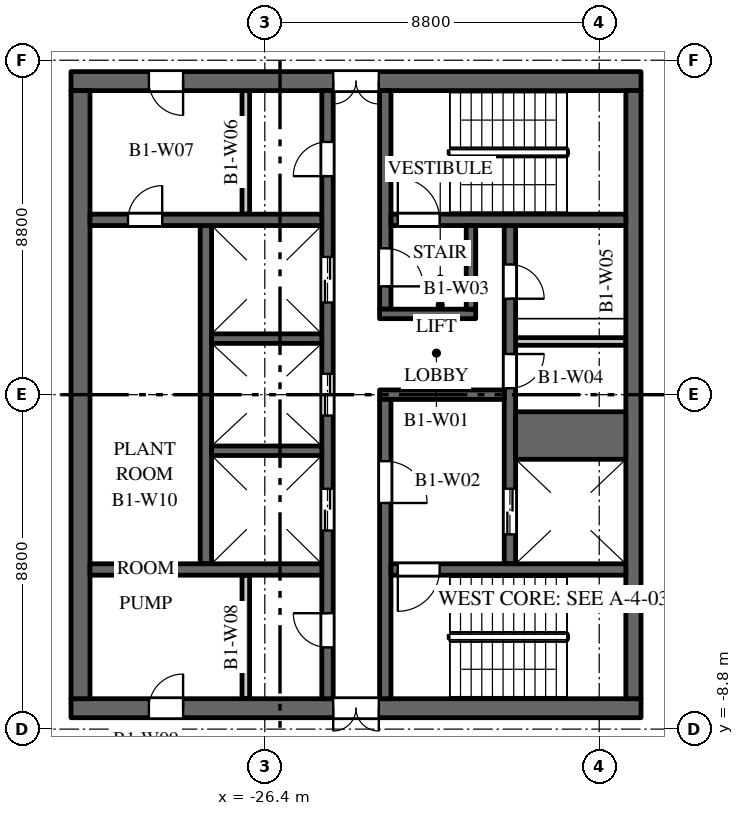
"""IFC4 building model, lengths in metres.
Left out: names, types, materials, properties, quantities, classifications, styles, units other than length and angle.
Written with IfcOpenShell. Run it as: python <this file> out.ifc"""

import sys

from ifc_helpers import new_model, si_unit, direction, frame, frame_2d, origin, place, context, subcontext, project, spatial, rectangle, extrude, element, fill, save


model = new_model("IFC4")
c1 = context("Model", 3, precision=1e-05, world=origin(), true_north=direction((0.0, 1.0)))
c2 = subcontext(c1, "Body", "Model", "MODEL_VIEW")
j1 = project(units=[si_unit("LENGTHUNIT", "METRE"), si_unit("PLANEANGLEUNIT", "RADIAN")], contexts=[c1])
p1 = place(None, origin())
s1 = spatial("IfcSite", under=j1, at=p1, CompositionType="ELEMENT")
p2 = place(p1, origin())
s2 = spatial("IfcBuilding", under=s1, at=p2, CompositionType="ELEMENT")
p3 = place(p2, frame((0.0, 0.0, -4.2)))
s3 = spatial("IfcBuildingStorey", under=s2, at=p3, CompositionType="ELEMENT", Elevation=-4.2)
p4 = place(p3, frame((-16.5, 8.25, 0.0), z_axis=(0.0, 0.0, 1.0), x_axis=(-1.0, 0.0, 0.0)))
e1 = element("IfcWall", 1, at=p4, inside=s3, PredefinedType="SHEAR", context=c2, shape_type="SweptSolid", body=[
    extrude(rectangle(XDim=15.0, YDim=0.5, at=frame_2d((7.5, 0.0))), origin(), (0.0, 0.0, 1.0), 3.85),
])
p5 = place(p4, frame((6.9, 0.0, 0.0)))
e2 = element("IfcOpeningElement", 2, at=p5, cuts=e1, PredefinedType="OPENING", context=c2, shape_type="SweptSolid", body=[
    extrude(rectangle(XDim=1.2, YDim=2.1, at=frame_2d((0.6, 1.05))), frame((0.0, 0.26, 0.0), z_axis=(0.0, -1.0, 0.0), x_axis=(1.0, 0.0, 0.0)), (0.0, 0.0, 1.0), 0.52),
])
p6 = place(p4, frame((12.05, 0.0, 0.0)))
e3 = element("IfcOpeningElement", 3, at=p6, cuts=e1, PredefinedType="OPENING", context=c2, shape_type="SweptSolid", body=[
    extrude(rectangle(XDim=0.9, YDim=2.1, at=frame_2d((0.45, 1.05))), frame((0.0, 0.26, 0.0), z_axis=(0.0, -1.0, 0.0), x_axis=(1.0, 0.0, 0.0)), (0.0, 0.0, 1.0), 0.52),
])
p7 = place(p3, frame((-16.5, -8.25, 0.0), z_axis=(0.0, 0.0, 1.0), x_axis=(-1.0, 0.0, 0.0)))
e4 = element("IfcWall", 4, at=p7, inside=s3, PredefinedType="SHEAR", context=c2, shape_type="SweptSolid", body=[
    extrude(rectangle(XDim=15.0, YDim=0.5, at=frame_2d((7.5, 0.0))), origin(), (0.0, 0.0, 1.0), 3.85),
])
p8 = place(p7, frame((6.9, 0.0, 0.0)))
e5 = element("IfcOpeningElement", 5, at=p8, cuts=e4, PredefinedType="OPENING", context=c2, shape_type="SweptSolid", body=[
    extrude(rectangle(XDim=1.2, YDim=2.1, at=frame_2d((0.6, 1.05))), frame((0.0, 0.26, 0.0), z_axis=(0.0, -1.0, 0.0), x_axis=(1.0, 0.0, 0.0)), (0.0, 0.0, 1.0), 0.52),
])
p9 = place(p7, frame((12.05, 0.0, 0.0)))
e6 = element("IfcOpeningElement", 6, at=p9, cuts=e4, PredefinedType="OPENING", context=c2, shape_type="SweptSolid", body=[
    extrude(rectangle(XDim=0.9, YDim=2.1, at=frame_2d((0.45, 1.05))), frame((0.0, 0.26, 0.0), z_axis=(0.0, -1.0, 0.0), x_axis=(1.0, 0.0, 0.0)), (0.0, 0.0, 1.0), 0.52),
])
p10 = place(p3, frame((-16.9, 1.4, 0.0), z_axis=(0.0, 0.0, 1.0), x_axis=(-1.0, 0.0, 0.0)))
e7 = element("IfcWall", 7, at=p10, inside=s3, PredefinedType="PARTITIONING", context=c2, shape_type="SweptSolid", body=[
    extrude(rectangle(XDim=2.9, YDim=0.2, at=frame_2d((1.45, 0.0))), origin(), (0.0, 0.0, 1.0), 3.85),
])
p11 = place(p3, frame((-27.95, -4.45, 0.0), z_axis=(0.0, 0.0, 1.0), x_axis=(0.0, 1.0, 0.0)))
e8 = element("IfcWall", 8, at=p11, inside=s3, PredefinedType="SHEAR", context=c2, shape_type="SweptSolid", body=[
    extrude(rectangle(XDim=8.9, YDim=0.3, at=frame_2d((4.45, 0.0))), origin(), (0.0, 0.0, 1.0), 3.85),
])
p12 = place(p3, frame((-19.95, -4.45, 0.0), z_axis=(0.0, 0.0, 1.0), x_axis=(0.0, 1.0, 0.0)))
e9 = element("IfcWall", 9, at=p12, inside=s3, PredefinedType="SHEAR", context=c2, shape_type="SweptSolid", body=[
    extrude(rectangle(XDim=8.9, YDim=0.3, at=frame_2d((4.45, 0.0))), origin(), (0.0, 0.0, 1.0), 3.85),
])
p13 = place(p12, frame((0.775, 0.0, 0.0)))
e10 = element("IfcOpeningElement", 10, at=p13, cuts=e9, PredefinedType="OPENING", context=c2, shape_type="SweptSolid", body=[
    extrude(rectangle(XDim=1.2, YDim=2.1, at=frame_2d((0.6, 1.05))), frame((0.0, 0.16, 0.0), z_axis=(0.0, -1.0, 0.0), x_axis=(1.0, 0.0, 0.0)), (0.0, 0.0, 1.0), 0.32),
])
p14 = place(p12, frame((4.62, 0.0, 0.0)))
e11 = element("IfcOpeningElement", 11, at=p14, cuts=e9, PredefinedType="OPENING", context=c2, shape_type="SweptSolid", body=[
    extrude(rectangle(XDim=0.9, YDim=2.1, at=frame_2d((0.45, 1.05))), frame((0.0, 0.16, 0.0), z_axis=(0.0, -1.0, 0.0), x_axis=(1.0, 0.0, 0.0)), (0.0, 0.0, 1.0), 0.32),
])
p15 = place(p12, frame((6.975, 0.0, 0.0)))
e12 = element("IfcOpeningElement", 12, at=p15, cuts=e9, PredefinedType="OPENING", context=c2, shape_type="SweptSolid", body=[
    extrude(rectangle(XDim=0.9, YDim=2.1, at=frame_2d((0.45, 1.05))), frame((0.0, 0.16, 0.0), z_axis=(0.0, -1.0, 0.0), x_axis=(1.0, 0.0, 0.0)), (0.0, 0.0, 1.0), 0.32),
])
p16 = place(p3, frame((-24.75, -8.0, 0.0), z_axis=(0.0, 0.0, 1.0), x_axis=(0.0, 1.0, 0.0)))
e13 = element("IfcWall", 13, at=p16, inside=s3, PredefinedType="SHEAR", context=c2, shape_type="SweptSolid", body=[
    extrude(rectangle(XDim=16.0, YDim=0.3, at=frame_2d((8.0, 0.0))), origin(), (0.0, 0.0, 1.0), 3.85),
])
p17 = place(p16, frame((4.425, 0.0, 0.0)))
e14 = element("IfcOpeningElement", 14, at=p17, cuts=e13, PredefinedType="OPENING", context=c2, shape_type="SweptSolid", body=[
    extrude(rectangle(XDim=1.1, YDim=2.1, at=frame_2d((0.55, 1.05))), frame((0.0, 0.16, 0.0), z_axis=(0.0, -1.0, 0.0), x_axis=(1.0, 0.0, 0.0)), (0.0, 0.0, 1.0), 0.32),
])
p18 = place(p16, frame((7.45, 0.0, 0.0)))
e15 = element("IfcOpeningElement", 15, at=p18, cuts=e13, PredefinedType="OPENING", context=c2, shape_type="SweptSolid", body=[
    extrude(rectangle(XDim=1.1, YDim=2.1, at=frame_2d((0.55, 1.05))), frame((0.0, 0.16, 0.0), z_axis=(0.0, -1.0, 0.0), x_axis=(1.0, 0.0, 0.0)), (0.0, 0.0, 1.0), 0.32),
])
p19 = place(p16, frame((10.425, 0.0, 0.0)))
e16 = element("IfcOpeningElement", 16, at=p19, cuts=e13, PredefinedType="OPENING", context=c2, shape_type="SweptSolid", body=[
    extrude(rectangle(XDim=1.2, YDim=2.1, at=frame_2d((0.6, 1.05))), frame((0.0, 0.16, 0.0), z_axis=(0.0, -1.0, 0.0), x_axis=(1.0, 0.0, 0.0)), (0.0, 0.0, 1.0), 0.32),
])
p20 = place(p16, frame((13.75, 0.0, 0.0)))
e17 = element("IfcOpeningElement", 17, at=p20, cuts=e13, PredefinedType="OPENING", context=c2, shape_type="SweptSolid", body=[
    extrude(rectangle(XDim=0.9, YDim=2.1, at=frame_2d((0.45, 1.05))), frame((0.0, 0.16, 0.0), z_axis=(0.0, -1.0, 0.0), x_axis=(1.0, 0.0, 0.0)), (0.0, 0.0, 1.0), 0.32),
])
p21 = place(p16, frame((1.35, 0.0, 0.0)))
e18 = element("IfcOpeningElement", 18, at=p21, cuts=e13, PredefinedType="OPENING", context=c2, shape_type="SweptSolid", body=[
    extrude(rectangle(XDim=0.9, YDim=2.1, at=frame_2d((0.45, 1.05))), frame((0.0, 0.16, 0.0), z_axis=(0.0, -1.0, 0.0), x_axis=(1.0, 0.0, 0.0)), (0.0, 0.0, 1.0), 0.32),
])
p22 = place(p3, frame((-20.1, 0.0, 0.0), z_axis=(0.0, 0.0, 1.0), x_axis=(-1.0, 0.0, 0.0)))
e19 = element("IfcWall", 19, at=p22, inside=s3, PredefinedType="SHEAR", context=c2, shape_type="SweptSolid", body=[
    extrude(rectangle(XDim=3.28, YDim=0.25, at=frame_2d((1.64, 0.0))), origin(), (0.0, 0.0, 1.0), 3.85),
])
p23 = place(p3, frame((-16.7, -8.0, 0.0), z_axis=(0.0, 0.0, 1.0), x_axis=(0.0, 1.0, 0.0)))
e20 = element("IfcWall", 20, at=p23, inside=s3, PredefinedType="SHEAR", context=c2, shape_type="SweptSolid", body=[
    extrude(rectangle(XDim=16.0, YDim=0.4, at=frame_2d((8.0, 0.0))), origin(), (0.0, 0.0, 1.0), 3.85),
])
p24 = place(p3, frame((-31.25, -8.0, 0.0), z_axis=(0.0, 0.0, 1.0), x_axis=(0.0, 1.0, 0.0)))
e21 = element("IfcWall", 21, at=p24, inside=s3, PredefinedType="SHEAR", context=c2, shape_type="SweptSolid", body=[
    extrude(rectangle(XDim=16.0, YDim=0.5, at=frame_2d((8.0, 0.0))), origin(), (0.0, 0.0, 1.0), 3.85),
])
p25 = place(p3, frame((-24.9, 4.6, 0.0), z_axis=(0.0, 0.0, 1.0), x_axis=(-1.0, 0.0, 0.0)))
e22 = element("IfcWall", 22, at=p25, inside=s3, PredefinedType="SHEAR", context=c2, shape_type="SweptSolid", body=[
    extrude(rectangle(XDim=6.1, YDim=0.3, at=frame_2d((3.05, 0.0))), origin(), (0.0, 0.0, 1.0), 3.85),
])
p26 = place(p25, frame((4.2, 0.0, 0.0)))
e23 = element("IfcOpeningElement", 23, at=p26, cuts=e22, PredefinedType="OPENING", context=c2, shape_type="SweptSolid", body=[
    extrude(rectangle(XDim=0.9, YDim=2.1, at=frame_2d((0.45, 1.05))), frame((0.0, 0.16, 0.0), z_axis=(0.0, -1.0, 0.0), x_axis=(1.0, 0.0, 0.0)), (0.0, 0.0, 1.0), 0.32),
])
for number, where, z_axis, x_axis in (
    (24, (-26.9, 4.75, 0.0), (0.0, 0.0, 1.0), (0.0, 1.0, 0.0)),
    (25, (-26.9, -8.0, 0.0), (0.0, 0.0, 1.0), (0.0, 1.0, 0.0)),
):
    element("IfcWall", number, at=place(p3, frame(where, z_axis=z_axis, x_axis=x_axis)), inside=s3, PredefinedType="PARTITIONING", context=c2, shape_type="SweptSolid", body=[
        extrude(rectangle(XDim=3.25, YDim=0.2, at=frame_2d((1.625, 0.0))), origin(), (0.0, 0.0, 1.0), 3.85),
    ])
p27 = place(p3, frame((-24.9, -4.6, 0.0), z_axis=(0.0, 0.0, 1.0), x_axis=(-1.0, 0.0, 0.0)))
e26 = element("IfcWall", 26, at=p27, inside=s3, PredefinedType="SHEAR", context=c2, shape_type="SweptSolid", body=[
    extrude(rectangle(XDim=6.1, YDim=0.3, at=frame_2d((3.05, 0.0))), origin(), (0.0, 0.0, 1.0), 3.85),
])
p28 = place(p3, frame((-16.9, -1.075, 0.0), z_axis=(0.0, 0.0, 1.0), x_axis=(-1.0, 0.0, 0.0)))
e27 = element("IfcWall", 27, at=p28, inside=s3, PredefinedType="SHEAR", context=c2, shape_type="SweptSolid", body=[
    extrude(rectangle(XDim=2.9, YDim=1.25, at=frame_2d((1.45, 0.0))), origin(), (0.0, 0.0, 1.0), 3.85),
])
for number, where, z_axis, x_axis in (
    (28, (-24.9, -1.475, 0.0), (0.0, 0.0, 1.0), (-1.0, 0.0, 0.0)),
    (29, (-24.9, 1.475, 0.0), (0.0, 0.0, 1.0), (-1.0, 0.0, 0.0)),
):
    element("IfcWall", number, at=place(p3, frame(where, z_axis=z_axis, x_axis=x_axis)), inside=s3, PredefinedType="SHEAR", context=c2, shape_type="SweptSolid", body=[
        extrude(rectangle(XDim=2.9, YDim=0.25, at=frame_2d((1.45, 0.0))), origin(), (0.0, 0.0, 1.0), 3.85),
    ])
p29 = place(p3, frame((-23.23, 2.25, 0.0), z_axis=(0.0, 0.0, 1.0), x_axis=(0.0, 1.0, 0.0)))
e30 = element("IfcWall", 30, at=p29, inside=s3, PredefinedType="SHEAR", context=c2, shape_type="SweptSolid", body=[
    extrude(rectangle(XDim=5.75, YDim=0.3, at=frame_2d((2.875, 0.0))), origin(), (0.0, 0.0, 1.0), 3.85),
])
p30 = place(p29, frame((0.6, 0.0, 0.0)))
e31 = element("IfcOpeningElement", 31, at=p30, cuts=e30, PredefinedType="OPENING", context=c2, shape_type="SweptSolid", body=[
    extrude(rectangle(XDim=1.0, YDim=2.1, at=frame_2d((0.5, 1.05))), frame((0.0, 0.16, 0.0), z_axis=(0.0, -1.0, 0.0), x_axis=(1.0, 0.0, 0.0)), (0.0, 0.0, 1.0), 0.32),
])
p31 = place(p3, frame((-23.23, -8.0, 0.0), z_axis=(0.0, 0.0, 1.0), x_axis=(0.0, 1.0, 0.0)))
e32 = element("IfcWall", 32, at=p31, inside=s3, PredefinedType="SHEAR", context=c2, shape_type="SweptSolid", body=[
    extrude(rectangle(XDim=7.875, YDim=0.3, at=frame_2d((3.938, 0.0))), origin(), (0.0, 0.0, 1.0), 3.85),
])
p32 = place(p31, frame((5.15, 0.0, 0.0)))
e33 = element("IfcOpeningElement", 33, at=p32, cuts=e32, PredefinedType="OPENING", context=c2, shape_type="SweptSolid", body=[
    extrude(rectangle(XDim=1.1, YDim=2.1, at=frame_2d((0.55, 1.05))), frame((0.0, 0.16, 0.0), z_axis=(0.0, -1.0, 0.0), x_axis=(1.0, 0.0, 0.0)), (0.0, 0.0, 1.0), 0.32),
])
p33 = place(p3, frame((-16.9, 4.6, 0.0), z_axis=(0.0, 0.0, 1.0), x_axis=(-1.0, 0.0, 0.0)))
e34 = element("IfcWall", 34, at=p33, inside=s3, PredefinedType="SHEAR", context=c2, shape_type="SweptSolid", body=[
    extrude(rectangle(XDim=6.18, YDim=0.3, at=frame_2d((3.09, 0.0))), origin(), (0.0, 0.0, 1.0), 3.85),
])
p34 = place(p33, frame((4.9, 0.0, 0.0)))
e35 = element("IfcOpeningElement", 35, at=p34, cuts=e34, PredefinedType="OPENING", context=c2, shape_type="SweptSolid", body=[
    extrude(rectangle(XDim=1.1, YDim=2.1, at=frame_2d((0.55, 1.05))), frame((0.0, 0.16, 0.0), z_axis=(0.0, -1.0, 0.0), x_axis=(1.0, 0.0, 0.0)), (0.0, 0.0, 1.0), 0.32),
])
p35 = place(p3, frame((-16.9, -4.6, 0.0), z_axis=(0.0, 0.0, 1.0), x_axis=(-1.0, 0.0, 0.0)))
e36 = element("IfcWall", 36, at=p35, inside=s3, PredefinedType="SHEAR", context=c2, shape_type="SweptSolid", body=[
    extrude(rectangle(XDim=6.18, YDim=0.3, at=frame_2d((3.09, 0.0))), origin(), (0.0, 0.0, 1.0), 3.85),
])
p36 = place(p35, frame((4.9, 0.0, 0.0)))
e37 = element("IfcOpeningElement", 37, at=p36, cuts=e36, PredefinedType="OPENING", context=c2, shape_type="SweptSolid", body=[
    extrude(rectangle(XDim=1.1, YDim=2.1, at=frame_2d((0.55, 1.05))), frame((0.0, 0.16, 0.0), z_axis=(0.0, -1.0, 0.0), x_axis=(1.0, 0.0, 0.0)), (0.0, 0.0, 1.0), 0.32),
])
p37 = place(p3, frame((-20.85, 2.125, 0.0), z_axis=(0.0, 0.0, 1.0), x_axis=(-1.0, 0.0, 0.0)))
e38 = element("IfcWall", 38, at=p37, inside=s3, PredefinedType="SHEAR", context=c2, shape_type="SweptSolid", body=[
    extrude(rectangle(XDim=2.53, YDim=0.25, at=frame_2d((1.265, 0.0))), origin(), (0.0, 0.0, 1.0), 3.85),
])
p38 = place(p3, frame((-20.975, 2.25, 0.0), z_axis=(0.0, 0.0, 1.0), x_axis=(0.0, 1.0, 0.0)))
e39 = element("IfcWall", 39, at=p38, inside=s3, PredefinedType="SHEAR", context=c2, shape_type="SweptSolid", body=[
    extrude(rectangle(XDim=2.2, YDim=0.25, at=frame_2d((1.1, 0.0))), origin(), (0.0, 0.0, 1.0), 3.85),
])
p39 = place(p3, frame((-31.157, 11.729, 0.0), z_axis=(0.0, 0.0, 1.0), x_axis=(-0.462265314279, -0.886741664305, 0.0)))
e40 = element("IfcWall", 40, at=p39, inside=s3, PredefinedType="SOLIDWALL", context=c2, shape_type="SweptSolid", body=[
    extrude(rectangle(XDim=4.135, YDim=0.25, at=frame_2d((2.067, 0.0))), origin(), (0.0, 0.0, 1.0), 2.95),
])
p40 = place(p39, frame((1.467, 0.0, 0.0)))
e41 = element("IfcOpeningElement", 41, at=p40, cuts=e40, PredefinedType="OPENING", context=c2, shape_type="SweptSolid", body=[
    extrude(rectangle(XDim=1.2, YDim=2.1, at=frame_2d((0.6, 1.05))), frame((0.0, 0.135, 0.0), z_axis=(0.0, -1.0, 0.0), x_axis=(1.0, 0.0, 0.0)), (0.0, 0.0, 1.0), 0.27),
])
p41 = place(p3, frame((-33.069, -8.062, 0.0), z_axis=(0.0, 0.0, 1.0), x_axis=(0.462265314279, -0.886741664305, 0.0)))
e42 = element("IfcWall", 42, at=p41, inside=s3, PredefinedType="SOLIDWALL", context=c2, shape_type="SweptSolid", body=[
    extrude(rectangle(XDim=4.135, YDim=0.25, at=frame_2d((2.067, 0.0))), origin(), (0.0, 0.0, 1.0), 2.95),
])
p42 = place(p13, origin())
e43 = element("IfcDoor", 43, at=p42, inside=s3, OperationType="DOUBLE_DOOR_SLIDING", PredefinedType="DOOR", context=c2, shape_type="SweptSolid", body=[
    extrude(rectangle(XDim=1.2, YDim=2.1, at=frame_2d((0.6, 1.05))), frame((0.0, 0.025, 0.0), z_axis=(0.0, -1.0, 0.0), x_axis=(1.0, 0.0, 0.0)), (0.0, 0.0, 1.0), 0.05),
])
fill(e10, e43)
p43 = place(p17, origin())
e44 = element("IfcDoor", 44, at=p43, inside=s3, OperationType="DOUBLE_DOOR_SLIDING", PredefinedType="DOOR", context=c2, shape_type="SweptSolid", body=[
    extrude(rectangle(XDim=1.1, YDim=2.1, at=frame_2d((0.55, 1.05))), frame((0.0, 0.025, 0.0), z_axis=(0.0, -1.0, 0.0), x_axis=(1.0, 0.0, 0.0)), (0.0, 0.0, 1.0), 0.05),
])
fill(e14, e44)
p44 = place(p18, origin())
e45 = element("IfcDoor", 45, at=p44, inside=s3, OperationType="DOUBLE_DOOR_SLIDING", PredefinedType="DOOR", context=c2, shape_type="SweptSolid", body=[
    extrude(rectangle(XDim=1.1, YDim=2.1, at=frame_2d((0.55, 1.05))), frame((0.0, 0.025, 0.0), z_axis=(0.0, -1.0, 0.0), x_axis=(1.0, 0.0, 0.0)), (0.0, 0.0, 1.0), 0.05),
])
fill(e15, e45)
p45 = place(p19, origin())
e46 = element("IfcDoor", 46, at=p45, inside=s3, OperationType="DOUBLE_DOOR_SLIDING", PredefinedType="DOOR", context=c2, shape_type="SweptSolid", body=[
    extrude(rectangle(XDim=1.2, YDim=2.1, at=frame_2d((0.6, 1.05))), frame((0.0, 0.025, 0.0), z_axis=(0.0, -1.0, 0.0), x_axis=(1.0, 0.0, 0.0)), (0.0, 0.0, 1.0), 0.05),
])
fill(e16, e46)
p46 = place(p34, origin())
e47 = element("IfcDoor", 47, at=p46, inside=s3, OperationType="SINGLE_SWING_RIGHT", PredefinedType="DOOR", context=c2, shape_type="SweptSolid", body=[
    extrude(rectangle(XDim=1.1, YDim=2.1, at=frame_2d((0.55, 1.05))), frame((0.0, 0.025, 0.0), z_axis=(0.0, -1.0, 0.0), x_axis=(1.0, 0.0, 0.0)), (0.0, 0.0, 1.0), 0.05),
])
fill(e35, e47)
p47 = place(p36, origin())
e48 = element("IfcDoor", 48, at=p47, inside=s3, OperationType="SINGLE_SWING_LEFT", PredefinedType="DOOR", context=c2, shape_type="SweptSolid", body=[
    extrude(rectangle(XDim=1.1, YDim=2.1, at=frame_2d((0.55, 1.05))), frame((0.0, 0.025, 0.0), z_axis=(0.0, -1.0, 0.0), x_axis=(1.0, 0.0, 0.0)), (0.0, 0.0, 1.0), 0.05),
])
fill(e37, e48)
p48 = place(p32, origin())
e49 = element("IfcDoor", 49, at=p48, inside=s3, OperationType="SINGLE_SWING_LEFT", PredefinedType="DOOR", context=c2, shape_type="SweptSolid", body=[
    extrude(rectangle(XDim=1.1, YDim=2.1, at=frame_2d((0.55, 1.05))), frame((0.0, 0.025, 0.0), z_axis=(0.0, -1.0, 0.0), x_axis=(1.0, 0.0, 0.0)), (0.0, 0.0, 1.0), 0.05),
])
fill(e33, e49)
p49 = place(p30, origin())
e50 = element("IfcDoor", 50, at=p49, inside=s3, OperationType="SINGLE_SWING_LEFT", PredefinedType="DOOR", context=c2, shape_type="SweptSolid", body=[
    extrude(rectangle(XDim=1.0, YDim=2.1, at=frame_2d((0.5, 1.05))), frame((0.0, 0.025, 0.0), z_axis=(0.0, -1.0, 0.0), x_axis=(1.0, 0.0, 0.0)), (0.0, 0.0, 1.0), 0.05),
])
fill(e31, e50)
p50 = place(p5, origin())
e51 = element("IfcDoor", 51, at=p50, inside=s3, OperationType="DOUBLE_DOOR_DOUBLE_SWING", PredefinedType="DOOR", context=c2, shape_type="SweptSolid", body=[
    extrude(rectangle(XDim=1.2, YDim=2.1, at=frame_2d((0.6, 1.05))), frame((0.0, 0.025, 0.0), z_axis=(0.0, -1.0, 0.0), x_axis=(1.0, 0.0, 0.0)), (0.0, 0.0, 1.0), 0.05),
])
fill(e2, e51)
p51 = place(p8, origin())
e52 = element("IfcDoor", 52, at=p51, inside=s3, OperationType="DOUBLE_DOOR_DOUBLE_SWING", PredefinedType="DOOR", context=c2, shape_type="SweptSolid", body=[
    extrude(rectangle(XDim=1.2, YDim=2.1, at=frame_2d((0.6, 1.05))), frame((0.0, 0.025, 0.0), z_axis=(0.0, -1.0, 0.0), x_axis=(1.0, 0.0, 0.0)), (0.0, 0.0, 1.0), 0.05),
])
fill(e5, e52)
p52 = place(p14, origin())
e53 = element("IfcDoor", 53, at=p52, inside=s3, OperationType="SINGLE_SWING_RIGHT", PredefinedType="DOOR", context=c2, shape_type="SweptSolid", body=[
    extrude(rectangle(XDim=0.9, YDim=2.1, at=frame_2d((0.45, 1.05))), frame((0.0, 0.025, 0.0), z_axis=(0.0, -1.0, 0.0), x_axis=(1.0, 0.0, 0.0)), (0.0, 0.0, 1.0), 0.05),
])
fill(e11, e53)
p53 = place(p15, origin())
e54 = element("IfcDoor", 54, at=p53, inside=s3, OperationType="SINGLE_SWING_LEFT", PredefinedType="DOOR", context=c2, shape_type="SweptSolid", body=[
    extrude(rectangle(XDim=0.9, YDim=2.1, at=frame_2d((0.45, 1.05))), frame((0.0, 0.025, 0.0), z_axis=(0.0, -1.0, 0.0), x_axis=(1.0, 0.0, 0.0)), (0.0, 0.0, 1.0), 0.05),
])
fill(e12, e54)
p54 = place(p20, origin())
e55 = element("IfcDoor", 55, at=p54, inside=s3, OperationType="SINGLE_SWING_RIGHT", PredefinedType="DOOR", context=c2, shape_type="SweptSolid", body=[
    extrude(rectangle(XDim=0.9, YDim=2.1, at=frame_2d((0.45, 1.05))), frame((0.0, 0.025, 0.0), z_axis=(0.0, -1.0, 0.0), x_axis=(1.0, 0.0, 0.0)), (0.0, 0.0, 1.0), 0.05),
])
fill(e17, e55)
p55 = place(p6, origin())
e56 = element("IfcDoor", 56, at=p55, inside=s3, OperationType="SINGLE_SWING_RIGHT", PredefinedType="DOOR", context=c2, shape_type="SweptSolid", body=[
    extrude(rectangle(XDim=0.9, YDim=2.1, at=frame_2d((0.45, 1.05))), frame((0.0, 0.025, 0.0), z_axis=(0.0, -1.0, 0.0), x_axis=(1.0, 0.0, 0.0)), (0.0, 0.0, 1.0), 0.05),
])
fill(e3, e56)
p56 = place(p21, origin())
e57 = element("IfcDoor", 57, at=p56, inside=s3, OperationType="SINGLE_SWING_LEFT", PredefinedType="DOOR", context=c2, shape_type="SweptSolid", body=[
    extrude(rectangle(XDim=0.9, YDim=2.1, at=frame_2d((0.45, 1.05))), frame((0.0, 0.025, 0.0), z_axis=(0.0, -1.0, 0.0), x_axis=(1.0, 0.0, 0.0)), (0.0, 0.0, 1.0), 0.05),
])
fill(e18, e57)
p57 = place(p9, origin())
e58 = element("IfcDoor", 58, at=p57, inside=s3, OperationType="SINGLE_SWING_LEFT", PredefinedType="DOOR", context=c2, shape_type="SweptSolid", body=[
    extrude(rectangle(XDim=0.9, YDim=2.1, at=frame_2d((0.45, 1.05))), frame((0.0, 0.025, 0.0), z_axis=(0.0, -1.0, 0.0), x_axis=(1.0, 0.0, 0.0)), (0.0, 0.0, 1.0), 0.05),
])
fill(e6, e58)
p58 = place(p26, origin())
e59 = element("IfcDoor", 59, at=p58, inside=s3, OperationType="SINGLE_SWING_LEFT", PredefinedType="DOOR", context=c2, shape_type="SweptSolid", body=[
    extrude(rectangle(XDim=0.9, YDim=2.1, at=frame_2d((0.45, 1.05))), frame((0.0, 0.025, 0.0), z_axis=(0.0, -1.0, 0.0), x_axis=(1.0, 0.0, 0.0)), (0.0, 0.0, 1.0), 0.05),
])
fill(e23, e59)
save(model, sys.argv[1])
